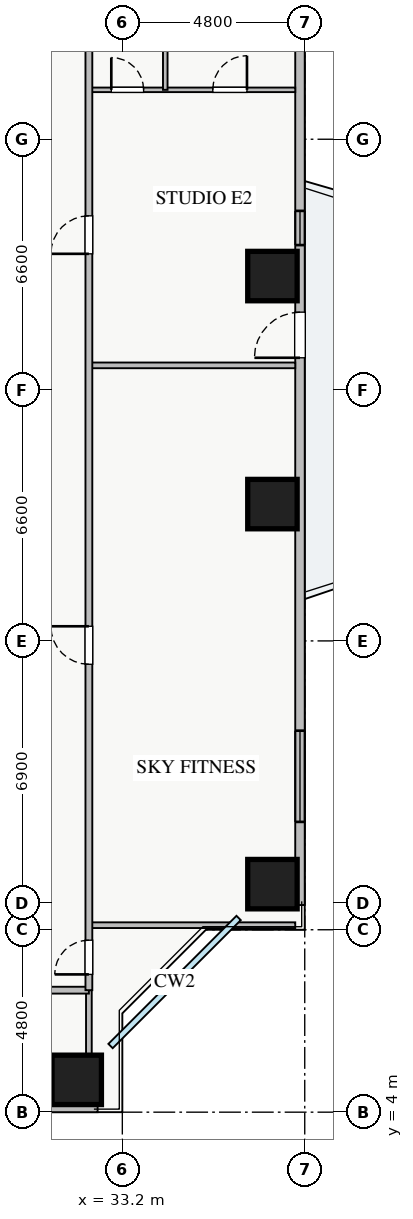
"""IFC4 building model, lengths in metres.
Left out: names, types, materials, properties, quantities, classifications, styles, units other than length and angle.
Written with IfcOpenShell. Run it as: python <this file> out.ifc"""

import sys

from ifc_helpers import new_model, si_unit, direction, frame, frame_2d, origin, origin_2d, place, context, subcontext, project, spatial, rectangle, extrude, source, transform, mapped, element, fill, save


model = new_model("IFC4")
c1 = context("Model", 3, precision=1e-05, world=origin(), true_north=direction((0.0, 1.0)))
c2 = subcontext(c1, "Body", "Model", "MODEL_VIEW")
j1 = project(units=[si_unit("LENGTHUNIT", "METRE"), si_unit("PLANEANGLEUNIT", "RADIAN")], contexts=[c1])
p1 = place(None, origin())
s1 = spatial("IfcSite", under=j1, at=p1, CompositionType="ELEMENT")
p2 = place(p1, origin())
s2 = spatial("IfcBuilding", under=s1, at=p2, CompositionType="ELEMENT")
p3 = place(p2, frame((0.0, 0.0, 29.5)))
s3 = spatial("IfcBuildingStorey", under=s2, at=p3, CompositionType="ELEMENT", Elevation=29.5)
m1 = source(origin(), c2, "Body", "SweptSolid", [
    extrude(rectangle(XDim=1.3, YDim=1.3, at=origin_2d()), origin(), (0.0, 0.0, 1.0), 3.25),
])
for number, where, z_axis, x_axis in (
    (1, (32.0, 4.85, 0.0), (0.0, 0.0, 1.0), (1.0, 0.0, 0.0)),
    (2, (37.15, 10.0, 0.0), (0.0, 0.0, 1.0), (1.0, 0.0, 0.0)),
    (3, (37.15, 20.0, 0.0), (0.0, 0.0, 1.0), (1.0, 0.0, 0.0)),
    (4, (37.15, 26.0, 0.0), (0.0, 0.0, 1.0), (1.0, 0.0, 0.0)),
):
    element("IfcColumn", number, at=place(p3, frame(where, z_axis=z_axis, x_axis=x_axis)), inside=s3, PredefinedType="COLUMN", context=c2, shape_type="MappedRepresentation", body=[
        mapped(m1, transform((0.0, 0.0, 0.0), x_axis=(1.0, 0.0, 0.0), y_axis=(0.0, 1.0, 0.0), z_axis=(0.0, 0.0, 1.0), scale=1.0)),
    ])
p4 = place(p3, frame((5.45, 4.125, 0.0), z_axis=(0.0, 0.0, 1.0), x_axis=(1.0, 0.0, 0.0)))
e5 = element("IfcWall", 5, at=p4, inside=s3, PredefinedType="STANDARD", context=c2, shape_type="SweptSolid", body=[
    extrude(rectangle(XDim=27.1, YDim=0.25, at=frame_2d((13.55, 0.0))), origin(), (0.0, 0.0, 1.0), 2.61),
])
p5 = place(p4, frame((14.4, 0.0, 0.0)))
e6 = element("IfcOpeningElement", 6, at=p5, cuts=e5, PredefinedType="OPENING", context=c2, shape_type="SweptSolid", body=[
    extrude(rectangle(XDim=1.2, YDim=2.1, at=frame_2d((0.6, 1.05))), frame((0.0, 0.135, 0.0), z_axis=(0.0, -1.0, 0.0), x_axis=(1.0, 0.0, 0.0)), (0.0, 0.0, 1.0), 0.27),
])
p6 = place(p4, frame((1.48, 0.0, 0.9)))
e7 = element("IfcOpeningElement", 7, at=p6, cuts=e5, PredefinedType="OPENING", context=c2, shape_type="SweptSolid", body=[
    extrude(rectangle(XDim=1.5, YDim=1.5, at=frame_2d((0.75, 0.75))), frame((0.0, 0.135, 0.0), z_axis=(0.0, -1.0, 0.0), x_axis=(1.0, 0.0, 0.0)), (0.0, 0.0, 1.0), 0.27),
])
p7 = place(p4, frame((9.263, 0.0, 0.9)))
e8 = element("IfcOpeningElement", 8, at=p7, cuts=e5, PredefinedType="OPENING", context=c2, shape_type="SweptSolid", body=[
    extrude(rectangle(XDim=1.8, YDim=1.45, at=frame_2d((0.9, 0.725))), frame((0.0, 0.135, 0.0), z_axis=(0.0, -1.0, 0.0), x_axis=(1.0, 0.0, 0.0)), (0.0, 0.0, 1.0), 0.27),
])
p8 = place(p4, frame((16.188, 0.0, 0.9)))
e9 = element("IfcOpeningElement", 9, at=p8, cuts=e5, PredefinedType="OPENING", context=c2, shape_type="SweptSolid", body=[
    extrude(rectangle(XDim=1.5, YDim=1.45, at=frame_2d((0.75, 0.725))), frame((0.0, 0.135, 0.0), z_axis=(0.0, -1.0, 0.0), x_axis=(1.0, 0.0, 0.0)), (0.0, 0.0, 1.0), 0.27),
])
p9 = place(p4, frame((22.663, 0.0, 0.9)))
e10 = element("IfcOpeningElement", 10, at=p9, cuts=e5, PredefinedType="OPENING", context=c2, shape_type="SweptSolid", body=[
    extrude(rectangle(XDim=2.1, YDim=1.48, at=frame_2d((1.05, 0.74))), frame((0.0, 0.135, 0.0), z_axis=(0.0, -1.0, 0.0), x_axis=(1.0, 0.0, 0.0)), (0.0, 0.0, 1.0), 0.27),
])
p10 = place(p4, frame((5.114, 0.0, 0.9)))
e11 = element("IfcOpeningElement", 11, at=p10, cuts=e5, PredefinedType="OPENING", context=c2, shape_type="SweptSolid", body=[
    extrude(rectangle(XDim=2.4, YDim=1.5, at=frame_2d((1.2, 0.75))), frame((0.0, 0.135, 0.0), z_axis=(0.0, -1.0, 0.0), x_axis=(1.0, 0.0, 0.0)), (0.0, 0.0, 1.0), 0.27),
])
p11 = place(p3, frame((37.875, 9.45, 0.0), z_axis=(0.0, 0.0, 1.0), x_axis=(0.0, 1.0, 0.0)))
e12 = element("IfcWall", 12, at=p11, inside=s3, PredefinedType="STANDARD", context=c2, shape_type="SweptSolid", body=[
    extrude(rectangle(XDim=27.1, YDim=0.25, at=frame_2d((13.55, 0.0))), origin(), (0.0, 0.0, 1.0), 2.61),
])
p12 = place(p11, frame((14.4, 0.0, 0.0)))
e13 = element("IfcOpeningElement", 13, at=p12, cuts=e12, PredefinedType="OPENING", context=c2, shape_type="SweptSolid", body=[
    extrude(rectangle(XDim=1.2, YDim=2.1, at=frame_2d((0.6, 1.05))), frame((0.0, 0.135, 0.0), z_axis=(0.0, -1.0, 0.0), x_axis=(1.0, 0.0, 0.0)), (0.0, 0.0, 1.0), 0.27),
])
p13 = place(p11, frame((2.188, 0.0, 0.9)))
e14 = element("IfcOpeningElement", 14, at=p13, cuts=e12, PredefinedType="OPENING", context=c2, shape_type="SweptSolid", body=[
    extrude(rectangle(XDim=2.4, YDim=1.48, at=frame_2d((1.2, 0.74))), frame((0.0, 0.135, 0.0), z_axis=(0.0, -1.0, 0.0), x_axis=(1.0, 0.0, 0.0)), (0.0, 0.0, 1.0), 0.27),
])
p14 = place(p11, frame((22.663, 0.0, 0.9)))
e15 = element("IfcOpeningElement", 15, at=p14, cuts=e12, PredefinedType="OPENING", context=c2, shape_type="SweptSolid", body=[
    extrude(rectangle(XDim=2.1, YDim=1.48, at=frame_2d((1.05, 0.74))), frame((0.0, 0.135, 0.0), z_axis=(0.0, -1.0, 0.0), x_axis=(1.0, 0.0, 0.0)), (0.0, 0.0, 1.0), 0.27),
])
p15 = place(p11, frame((17.365, 0.0, 0.9)))
e16 = element("IfcOpeningElement", 16, at=p15, cuts=e12, PredefinedType="OPENING", context=c2, shape_type="SweptSolid", body=[
    extrude(rectangle(XDim=0.9, YDim=1.2, at=frame_2d((0.45, 0.6))), frame((0.0, 0.135, 0.0), z_axis=(0.0, -1.0, 0.0), x_axis=(1.0, 0.0, 0.0)), (0.0, 0.0, 1.0), 0.27),
])
p16 = place(p3, frame((32.32, 4.25, 0.0), z_axis=(0.0, 0.0, 1.0), x_axis=(0.0, 1.0, 0.0)))
e17 = element("IfcWall", 17, at=p16, inside=s3, PredefinedType="PARTITIONING", context=c2, shape_type="SweptSolid", body=[
    extrude(rectangle(XDim=2.96, YDim=0.15, at=frame_2d((1.48, 0.0))), origin(), (0.0, 0.0, 1.0), 3.07),
])
p17 = place(p3, frame((8.78, 7.21, 0.0), z_axis=(0.0, 0.0, 1.0), x_axis=(1.0, 0.0, 0.0)))
e18 = element("IfcWall", 18, at=p17, inside=s3, PredefinedType="PARTITIONING", context=c2, shape_type="SweptSolid", body=[
    extrude(rectangle(XDim=23.54, YDim=0.18, at=frame_2d((11.77, 0.0))), origin(), (0.0, 0.0, 1.0), 3.07),
])
p18 = place(p17, frame((3.78, 0.0, 0.0)))
e19 = element("IfcOpeningElement", 19, at=p18, cuts=e18, PredefinedType="OPENING", context=c2, shape_type="SweptSolid", body=[
    extrude(rectangle(XDim=1.0, YDim=2.05, at=frame_2d((0.5, 1.025))), frame((0.0, 0.1, 0.0), z_axis=(0.0, -1.0, 0.0), x_axis=(1.0, 0.0, 0.0)), (0.0, 0.0, 1.0), 0.2),
])
p19 = place(p17, frame((11.625, 0.0, 0.0)))
e20 = element("IfcOpeningElement", 20, at=p19, cuts=e18, PredefinedType="OPENING", context=c2, shape_type="SweptSolid", body=[
    extrude(rectangle(XDim=1.0, YDim=2.05, at=frame_2d((0.5, 1.025))), frame((0.0, 0.1, 0.0), z_axis=(0.0, -1.0, 0.0), x_axis=(1.0, 0.0, 0.0)), (0.0, 0.0, 1.0), 0.2),
])
p20 = place(p17, frame((19.115, 0.0, 0.0)))
e21 = element("IfcOpeningElement", 21, at=p20, cuts=e18, PredefinedType="OPENING", context=c2, shape_type="SweptSolid", body=[
    extrude(rectangle(XDim=1.0, YDim=2.05, at=frame_2d((0.5, 1.025))), frame((0.0, 0.1, 0.0), z_axis=(0.0, -1.0, 0.0), x_axis=(1.0, 0.0, 0.0)), (0.0, 0.0, 1.0), 0.2),
])
p21 = place(p3, frame((32.32, 8.92, 0.0), z_axis=(0.0, 0.0, 1.0), x_axis=(1.0, 0.0, 0.0)))
e22 = element("IfcWall", 22, at=p21, inside=s3, PredefinedType="PARTITIONING", context=c2, shape_type="SweptSolid", body=[
    extrude(rectangle(XDim=5.43, YDim=0.15, at=frame_2d((2.715, 0.0))), origin(), (0.0, 0.0, 1.0), 3.07),
])
p22 = place(p3, frame((32.32, 30.9, 0.0), z_axis=(0.0, 0.0, 1.0), x_axis=(1.0, 0.0, 0.0)))
e23 = element("IfcWall", 23, at=p22, inside=s3, PredefinedType="PLUMBINGWALL", context=c2, shape_type="SweptSolid", body=[
    extrude(rectangle(XDim=5.43, YDim=0.12, at=frame_2d((2.715, 0.0))), origin(), (0.0, 0.0, 1.0), 3.07),
])
p23 = place(p22, frame((0.59, 0.0, 0.0)))
e24 = element("IfcOpeningElement", 24, at=p23, cuts=e23, PredefinedType="OPENING", context=c2, shape_type="SweptSolid", body=[
    extrude(rectangle(XDim=0.85, YDim=2.05, at=frame_2d((0.425, 1.025))), frame((0.0, 0.07, 0.0), z_axis=(0.0, -1.0, 0.0), x_axis=(1.0, 0.0, 0.0)), (0.0, 0.0, 1.0), 0.14),
])
p24 = place(p22, frame((3.26, 0.0, 0.0)))
e25 = element("IfcOpeningElement", 25, at=p24, cuts=e23, PredefinedType="OPENING", context=c2, shape_type="SweptSolid", body=[
    extrude(rectangle(XDim=0.9, YDim=2.05, at=frame_2d((0.45, 1.025))), frame((0.0, 0.07, 0.0), z_axis=(0.0, -1.0, 0.0), x_axis=(1.0, 0.0, 0.0)), (0.0, 0.0, 1.0), 0.14),
])
p25 = place(p3, frame((34.33, 30.9, 0.0), z_axis=(0.0, 0.0, 1.0), x_axis=(0.0, 1.0, 0.0)))
e26 = element("IfcWall", 26, at=p25, inside=s3, PredefinedType="PLUMBINGWALL", context=c2, shape_type="SweptSolid", body=[
    extrude(rectangle(XDim=6.18, YDim=0.12, at=frame_2d((3.09, 0.0))), origin(), (0.0, 0.0, 1.0), 3.07),
])
p26 = place(p3, frame((32.32, 23.65, 0.0), z_axis=(0.0, 0.0, 1.0), x_axis=(1.0, 0.0, 0.0)))
e27 = element("IfcWall", 27, at=p26, inside=s3, PredefinedType="PARTITIONING", context=c2, shape_type="SweptSolid", body=[
    extrude(rectangle(XDim=5.43, YDim=0.15, at=frame_2d((2.715, 0.0))), origin(), (0.0, 0.0, 1.0), 3.07),
])
p27 = place(p3, frame((32.32, 7.21, 0.0), z_axis=(0.0, 0.0, 1.0), x_axis=(0.0, 1.0, 0.0)))
e28 = element("IfcWall", 28, at=p27, inside=s3, PredefinedType="PARTITIONING", context=c2, shape_type="SweptSolid", body=[
    extrude(rectangle(XDim=31.23, YDim=0.18, at=frame_2d((15.615, 0.0))), origin(), (0.0, 0.0, 1.0), 2.765),
])
p28 = place(p27, frame((30.09, 0.0, 0.0)))
e29 = element("IfcOpeningElement", 29, at=p28, cuts=e28, PredefinedType="OPENING", context=c2, shape_type="SweptSolid", body=[
    extrude(rectangle(XDim=0.9, YDim=2.05, at=frame_2d((0.45, 1.025))), frame((0.0, 0.1, 0.0), z_axis=(0.0, -1.0, 0.0), x_axis=(1.0, 0.0, 0.0)), (0.0, 0.0, 1.0), 0.2),
])
p29 = place(p27, frame((0.415, 0.0, 0.0)))
e30 = element("IfcOpeningElement", 30, at=p29, cuts=e28, PredefinedType="OPENING", context=c2, shape_type="SweptSolid", body=[
    extrude(rectangle(XDim=0.9, YDim=2.05, at=frame_2d((0.45, 1.025))), frame((0.0, 0.1, 0.0), z_axis=(0.0, -1.0, 0.0), x_axis=(1.0, 0.0, 0.0)), (0.0, 0.0, 1.0), 0.2),
])
p30 = place(p27, frame((8.575, 0.0, 0.0)))
e31 = element("IfcOpeningElement", 31, at=p30, cuts=e28, PredefinedType="OPENING", context=c2, shape_type="SweptSolid", body=[
    extrude(rectangle(XDim=1.0, YDim=2.05, at=frame_2d((0.5, 1.025))), frame((0.0, 0.1, 0.0), z_axis=(0.0, -1.0, 0.0), x_axis=(1.0, 0.0, 0.0)), (0.0, 0.0, 1.0), 0.2),
])
p31 = place(p27, frame((19.375, 0.0, 0.0)))
e32 = element("IfcOpeningElement", 32, at=p31, cuts=e28, PredefinedType="OPENING", context=c2, shape_type="SweptSolid", body=[
    extrude(rectangle(XDim=1.0, YDim=2.05, at=frame_2d((0.5, 1.025))), frame((0.0, 0.1, 0.0), z_axis=(0.0, -1.0, 0.0), x_axis=(1.0, 0.0, 0.0)), (0.0, 0.0, 1.0), 0.2),
])
m2 = source(origin(), c2, "Body", "SweptSolid", [
    extrude(rectangle(XDim=1.2, YDim=2.1, at=frame_2d((0.6, 1.05))), frame((0.0, 0.025, 0.0), z_axis=(0.0, -1.0, 0.0), x_axis=(1.0, 0.0, 0.0)), (0.0, 0.0, 1.0), 0.05),
])
p32 = place(p12, origin())
e33 = element("IfcDoor", 33, at=p32, inside=s3, OperationType="SINGLE_SWING_LEFT", PredefinedType="DOOR", context=c2, shape_type="MappedRepresentation", body=[
    mapped(m2, transform((0.0, 0.0, 0.0), x_axis=(1.0, 0.0, 0.0), y_axis=(0.0, 1.0, 0.0), z_axis=(0.0, 0.0, 1.0), scale=1.0)),
])
fill(e13, e33)
m3 = source(origin(), c2, "Body", "SweptSolid", [
    extrude(rectangle(XDim=2.4, YDim=1.48, at=frame_2d((1.2, 0.74))), frame((0.0, 0.03, 0.0), z_axis=(0.0, -1.0, 0.0), x_axis=(1.0, 0.0, 0.0)), (0.0, 0.0, 1.0), 0.06),
])
p33 = place(p13, origin())
e34 = element("IfcWindow", 34, at=p33, inside=s3, PartitioningType="TRIPLE_PANEL_VERTICAL", PredefinedType="WINDOW", context=c2, shape_type="MappedRepresentation", body=[
    mapped(m3, transform((0.0, 0.0, 0.0), x_axis=(1.0, 0.0, 0.0), y_axis=(0.0, 1.0, 0.0), z_axis=(0.0, 0.0, 1.0), scale=1.0)),
])
fill(e14, e34)
m4 = source(origin(), c2, "Body", "SweptSolid", [
    extrude(rectangle(XDim=0.85, YDim=2.05, at=frame_2d((0.425, 1.025))), frame((0.0, 0.025, 0.0), z_axis=(0.0, -1.0, 0.0), x_axis=(1.0, 0.0, 0.0)), (0.0, 0.0, 1.0), 0.05),
])
p34 = place(p23, origin())
e35 = element("IfcDoor", 35, at=p34, inside=s3, OperationType="SINGLE_SWING_LEFT", PredefinedType="DOOR", context=c2, shape_type="MappedRepresentation", body=[
    mapped(m4, transform((0.0, 0.0, 0.0), x_axis=(1.0, 0.0, 0.0), y_axis=(0.0, 1.0, 0.0), z_axis=(0.0, 0.0, 1.0), scale=1.0)),
])
fill(e24, e35)
m5 = source(origin(), c2, "Body", "SweptSolid", [
    extrude(rectangle(XDim=0.9, YDim=2.05, at=frame_2d((0.45, 1.025))), frame((0.0, 0.025, 0.0), z_axis=(0.0, -1.0, 0.0), x_axis=(1.0, 0.0, 0.0)), (0.0, 0.0, 1.0), 0.05),
])
p35 = place(p24, origin())
e36 = element("IfcDoor", 36, at=p35, inside=s3, OperationType="SINGLE_SWING_RIGHT", PredefinedType="DOOR", context=c2, shape_type="MappedRepresentation", body=[
    mapped(m5, transform((0.0, 0.0, 0.0), x_axis=(1.0, 0.0, 0.0), y_axis=(0.0, 1.0, 0.0), z_axis=(0.0, 0.0, 1.0), scale=1.0)),
])
fill(e25, e36)
p36 = place(p29, origin())
e37 = element("IfcDoor", 37, at=p36, inside=s3, OperationType="SINGLE_SWING_LEFT", PredefinedType="DOOR", context=c2, shape_type="MappedRepresentation", body=[
    mapped(m5, transform((0.0, 0.0, 0.0), x_axis=(1.0, 0.0, 0.0), y_axis=(0.0, 1.0, 0.0), z_axis=(0.0, 0.0, 1.0), scale=1.0)),
])
fill(e30, e37)
m6 = source(origin(), c2, "Body", "SweptSolid", [
    extrude(rectangle(XDim=1.0, YDim=2.05, at=frame_2d((0.5, 1.025))), frame((0.0, 0.025, 0.0), z_axis=(0.0, -1.0, 0.0), x_axis=(1.0, 0.0, 0.0)), (0.0, 0.0, 1.0), 0.05),
])
p37 = place(p30, origin())
e38 = element("IfcDoor", 38, at=p37, inside=s3, OperationType="SINGLE_SWING_RIGHT", PredefinedType="DOOR", context=c2, shape_type="MappedRepresentation", body=[
    mapped(m6, transform((0.0, 0.0, 0.0), x_axis=(1.0, 0.0, 0.0), y_axis=(0.0, 1.0, 0.0), z_axis=(0.0, 0.0, 1.0), scale=1.0)),
])
fill(e31, e38)
p38 = place(p31, origin())
e39 = element("IfcDoor", 39, at=p38, inside=s3, OperationType="SINGLE_SWING_LEFT", PredefinedType="DOOR", context=c2, shape_type="MappedRepresentation", body=[
    mapped(m6, transform((0.0, 0.0, 0.0), x_axis=(1.0, 0.0, 0.0), y_axis=(0.0, 1.0, 0.0), z_axis=(0.0, 0.0, 1.0), scale=1.0)),
])
fill(e32, e39)
m7 = source(origin(), c2, "Body", "SweptSolid", [
    extrude(rectangle(XDim=0.9, YDim=1.2, at=frame_2d((0.45, 0.6))), frame((0.0, 0.03, 0.0), z_axis=(0.0, -1.0, 0.0), x_axis=(1.0, 0.0, 0.0)), (0.0, 0.0, 1.0), 0.06),
])
p39 = place(p15, origin())
e40 = element("IfcWindow", 40, at=p39, inside=s3, PartitioningType="SINGLE_PANEL", PredefinedType="WINDOW", context=c2, shape_type="MappedRepresentation", body=[
    mapped(m7, transform((0.0, 0.0, 0.0), x_axis=(1.0, 0.0, 0.0), y_axis=(0.0, 1.0, 0.0), z_axis=(0.0, 0.0, 1.0), scale=1.0)),
])
fill(e16, e40)
save(model, sys.argv[1])
